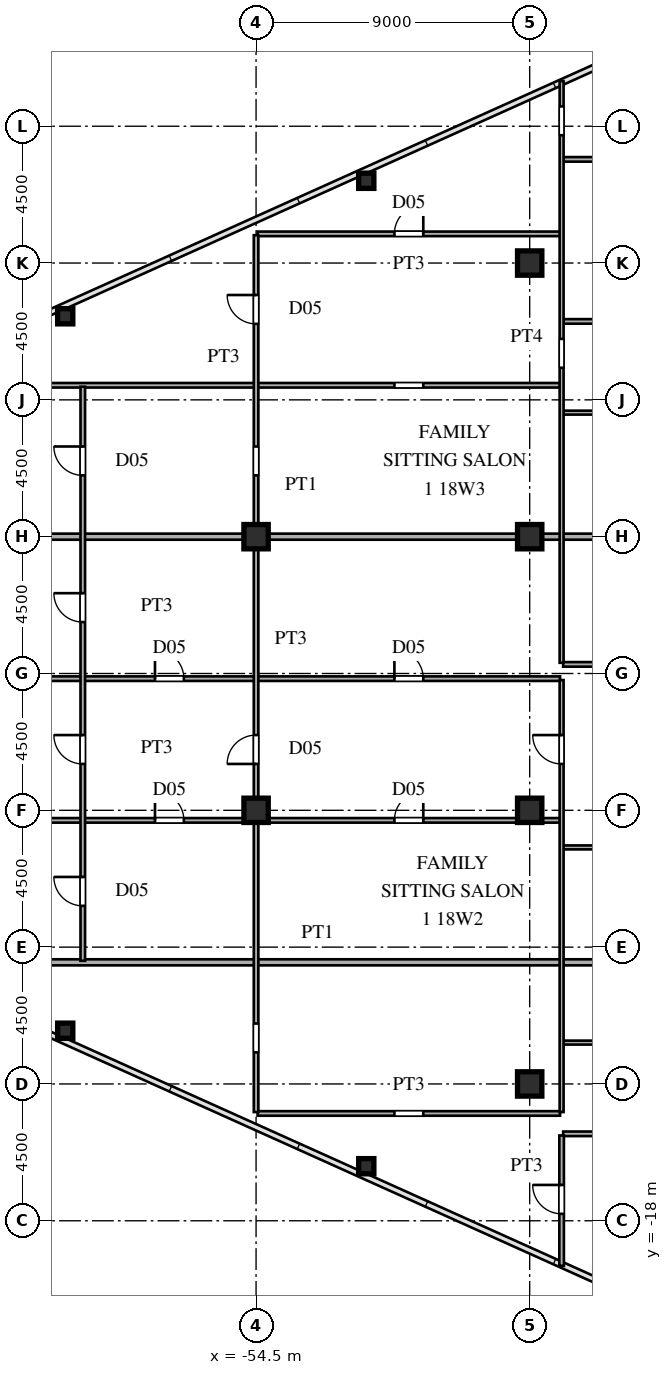
"""IFC4 building model, lengths in metres.
Left out: names, types, materials, properties, quantities, classifications, styles, units other than length and angle.
Written with IfcOpenShell. Run it as: python <this file> out.ifc"""

import sys

from ifc_helpers import new_model, si_unit, direction, frame, frame_2d, origin, origin_2d, place, context, subcontext, project, spatial, rectangle, hollow_rectangle, i_section, extrude, source, transform, mapped, element, fill, save


model = new_model("IFC4")
c1 = context("Model", 3, precision=1e-05, world=origin(), true_north=direction((0.0, 1.0)))
c2 = subcontext(c1, "Body", "Model", "MODEL_VIEW")
j1 = project(units=[si_unit("LENGTHUNIT", "METRE"), si_unit("PLANEANGLEUNIT", "RADIAN")], contexts=[c1])
p1 = place(None, origin())
s1 = spatial("IfcSite", under=j1, at=p1, CompositionType="ELEMENT")
p2 = place(p1, origin())
s2 = spatial("IfcBuilding", under=s1, at=p2, CompositionType="ELEMENT")
p3 = place(p2, frame((0.0, 0.0, 69.3)))
s3 = spatial("IfcBuildingStorey", under=s2, at=p3, CompositionType="ELEMENT", Elevation=69.3)
m1 = source(origin(), c2, "Body", "SweptSolid", [
    extrude(i_section(OverallWidth=0.8, OverallDepth=0.8, WebThickness=0.032, FlangeThickness=0.05, at=origin_2d()), origin(), (0.0, 0.0, 1.0), 3.6),
])
for number, where, z_axis, x_axis in (
    (1, (-45.5, -13.5, 0.0), (0.0, 0.0, 1.0), (1.0, 0.0, 0.0)),
    (2, (-45.5, -4.5, 0.0), (0.0, 0.0, 1.0), (1.0, 0.0, 0.0)),
    (3, (-45.5, 4.5, 0.0), (0.0, 0.0, 1.0), (1.0, 0.0, 0.0)),
    (4, (-45.5, 13.5, 0.0), (0.0, 0.0, 1.0), (1.0, 0.0, 0.0)),
    (5, (-54.5, -4.5, 0.0), (0.0, 0.0, 1.0), (1.0, 0.0, 0.0)),
    (6, (-54.5, 4.5, 0.0), (0.0, 0.0, 1.0), (1.0, 0.0, 0.0)),
):
    element("IfcColumn", number, at=place(p3, frame(where, z_axis=z_axis, x_axis=x_axis)), inside=s3, PredefinedType="COLUMN", context=c2, shape_type="MappedRepresentation", body=[
        mapped(m1, transform((0.0, 0.0, 0.0), scale=1.0)),
    ])
m2 = source(origin(), c2, "Body", "SweptSolid", [
    extrude(hollow_rectangle(XDim=0.5, YDim=0.5, WallThickness=0.02, at=origin_2d()), origin(), (0.0, 0.0, 1.0), 3.6),
])
for number, where, z_axis, x_axis in (
    (7, (-50.875, -16.205, 0.0), (0.0, 0.0, 1.0), (1.0, 0.0, 0.0)),
    (8, (-60.778, -11.749, 0.0), (0.0, 0.0, 1.0), (1.0, 0.0, 0.0)),
    (9, (-50.875, 16.205, 0.0), (0.0, 0.0, 1.0), (1.0, 0.0, 0.0)),
    (10, (-60.778, 11.749, 0.0), (0.0, 0.0, 1.0), (1.0, 0.0, 0.0)),
):
    element("IfcColumn", number, at=place(p3, frame(where, z_axis=z_axis, x_axis=x_axis)), inside=s3, PredefinedType="COLUMN", context=c2, shape_type="MappedRepresentation", body=[
        mapped(m2, transform((0.0, 0.0, 0.0), scale=1.0)),
    ])
p4 = place(p3, frame((-44.4, -15.14, 0.0), z_axis=(0.0, 0.0, 1.0), x_axis=(1.0, 0.0, 0.0)))
e11 = element("IfcWall", 11, at=p4, inside=s3, PredefinedType="PARTITIONING", context=c2, shape_type="SweptSolid", body=[
    extrude(rectangle(XDim=6.05, YDim=0.15, at=frame_2d((3.025, 0.0))), origin(), (0.0, 0.0, 1.0), 3.38),
])
p5 = place(p4, frame((2.55, 0.0, 0.0)))
e12 = element("IfcOpeningElement", 12, at=p5, cuts=e11, PredefinedType="OPENING", context=c2, shape_type="SweptSolid", body=[
    extrude(rectangle(XDim=0.95, YDim=2.15, at=frame_2d((0.475, 1.075))), frame((0.0, 0.085, 0.0), z_axis=(0.0, -1.0, 0.0), x_axis=(1.0, 0.0, 0.0)), (0.0, 0.0, 1.0), 0.17),
])
p6 = place(p3, frame((-54.45, -14.47, 0.0), z_axis=(0.0, 0.0, 1.0), x_axis=(1.0, 0.0, 0.0)))
e13 = element("IfcWall", 13, at=p6, inside=s3, PredefinedType="PARTITIONING", context=c2, shape_type="SweptSolid", body=[
    extrude(rectangle(XDim=9.95, YDim=0.15, at=frame_2d((4.975, 0.0))), origin(), (0.0, 0.0, 1.0), 3.38),
])
p7 = place(p6, frame((4.5, 0.0, 0.0)))
e14 = element("IfcOpeningElement", 14, at=p7, cuts=e13, PredefinedType="OPENING", context=c2, shape_type="SweptSolid", body=[
    extrude(rectangle(XDim=0.95, YDim=2.15, at=frame_2d((0.475, 1.075))), frame((0.0, 0.085, 0.0), z_axis=(0.0, -1.0, 0.0), x_axis=(1.0, 0.0, 0.0)), (0.0, 0.0, 1.0), 0.17),
])
p8 = place(p3, frame((-44.4, -12.14, 0.0), z_axis=(0.0, 0.0, 1.0), x_axis=(1.0, 0.0, 0.0)))
e15 = element("IfcWall", 15, at=p8, inside=s3, PredefinedType="PARTITIONING", context=c2, shape_type="SweptSolid", body=[
    extrude(rectangle(XDim=6.05, YDim=0.13, at=frame_2d((3.025, 0.0))), origin(), (0.0, 0.0, 1.0), 3.38),
])
p9 = place(p8, frame((2.585, 0.0, 0.0)))
e16 = element("IfcOpeningElement", 16, at=p9, cuts=e15, PredefinedType="OPENING", context=c2, shape_type="SweptSolid", body=[
    extrude(rectangle(XDim=0.88, YDim=2.1, at=frame_2d((0.44, 1.05))), frame((0.0, 0.075, 0.0), z_axis=(0.0, -1.0, 0.0), x_axis=(1.0, 0.0, 0.0)), (0.0, 0.0, 1.0), 0.15),
])
p10 = place(p3, frame((-66.568, -9.5, 0.0), z_axis=(0.0, 0.0, 1.0), x_axis=(1.0, 0.0, 0.0)))
e17 = element("IfcWall", 17, at=p10, inside=s3, PredefinedType="PARTITIONING", context=c2, shape_type="SweptSolid", body=[
    extrude(rectangle(XDim=28.188, YDim=0.2, at=frame_2d((14.094, 0.0))), origin(), (0.0, 0.0, 1.0), 3.38),
])
p11 = place(p3, frame((-44.4, -5.72, 0.0), z_axis=(0.0, 0.0, 1.0), x_axis=(1.0, 0.0, 0.0)))
e18 = element("IfcWall", 18, at=p11, inside=s3, PredefinedType="PARTITIONING", context=c2, shape_type="SweptSolid", body=[
    extrude(rectangle(XDim=6.05, YDim=0.13, at=frame_2d((3.025, 0.0))), origin(), (0.0, 0.0, 1.0), 3.38),
])
p12 = place(p11, frame((2.585, 0.0, 0.0)))
e19 = element("IfcOpeningElement", 19, at=p12, cuts=e18, PredefinedType="OPENING", context=c2, shape_type="SweptSolid", body=[
    extrude(rectangle(XDim=0.88, YDim=2.1, at=frame_2d((0.44, 1.05))), frame((0.0, 0.075, 0.0), z_axis=(0.0, -1.0, 0.0), x_axis=(1.0, 0.0, 0.0)), (0.0, 0.0, 1.0), 0.15),
])
p13 = place(p3, frame((-71.035, -4.83, 0.0), z_axis=(0.0, 0.0, 1.0), x_axis=(1.0, 0.0, 0.0)))
e20 = element("IfcWall", 20, at=p13, inside=s3, PredefinedType="PARTITIONING", context=c2, shape_type="SweptSolid", body=[
    extrude(rectangle(XDim=26.535, YDim=0.15, at=frame_2d((13.268, 0.0))), origin(), (0.0, 0.0, 1.0), 3.38),
])
p14 = place(p13, frame((21.085, 0.0, 0.0)))
e21 = element("IfcOpeningElement", 21, at=p14, cuts=e20, PredefinedType="OPENING", context=c2, shape_type="SweptSolid", body=[
    extrude(rectangle(XDim=0.95, YDim=2.15, at=frame_2d((0.475, 1.075))), frame((0.0, 0.085, 0.0), z_axis=(0.0, -1.0, 0.0), x_axis=(1.0, 0.0, 0.0)), (0.0, 0.0, 1.0), 0.17),
])
p15 = place(p13, frame((13.21, 0.0, 0.0)))
e22 = element("IfcOpeningElement", 22, at=p15, cuts=e20, PredefinedType="OPENING", context=c2, shape_type="SweptSolid", body=[
    extrude(rectangle(XDim=0.95, YDim=2.15, at=frame_2d((0.475, 1.075))), frame((0.0, 0.085, 0.0), z_axis=(0.0, -1.0, 0.0), x_axis=(1.0, 0.0, 0.0)), (0.0, 0.0, 1.0), 0.17),
])
p16 = place(p3, frame((-71.035, -0.17, 0.0), z_axis=(0.0, 0.0, 1.0), x_axis=(1.0, 0.0, 0.0)))
e23 = element("IfcWall", 23, at=p16, inside=s3, PredefinedType="PARTITIONING", context=c2, shape_type="SweptSolid", body=[
    extrude(rectangle(XDim=26.535, YDim=0.15, at=frame_2d((13.268, 0.0))), origin(), (0.0, 0.0, 1.0), 3.38),
])
p17 = place(p16, frame((21.085, 0.0, 0.0)))
e24 = element("IfcOpeningElement", 24, at=p17, cuts=e23, PredefinedType="OPENING", context=c2, shape_type="SweptSolid", body=[
    extrude(rectangle(XDim=0.95, YDim=2.15, at=frame_2d((0.475, 1.075))), frame((0.0, 0.085, 0.0), z_axis=(0.0, -1.0, 0.0), x_axis=(1.0, 0.0, 0.0)), (0.0, 0.0, 1.0), 0.17),
])
p18 = place(p16, frame((13.21, 0.0, 0.0)))
e25 = element("IfcOpeningElement", 25, at=p18, cuts=e23, PredefinedType="OPENING", context=c2, shape_type="SweptSolid", body=[
    extrude(rectangle(XDim=0.95, YDim=2.15, at=frame_2d((0.475, 1.075))), frame((0.0, 0.085, 0.0), z_axis=(0.0, -1.0, 0.0), x_axis=(1.0, 0.0, 0.0)), (0.0, 0.0, 1.0), 0.17),
])
p19 = place(p3, frame((-44.4, 0.3, 0.0), z_axis=(0.0, 0.0, 1.0), x_axis=(1.0, 0.0, 0.0)))
e26 = element("IfcWall", 26, at=p19, inside=s3, PredefinedType="PARTITIONING", context=c2, shape_type="SweptSolid", body=[
    extrude(rectangle(XDim=6.05, YDim=0.15, at=frame_2d((3.025, 0.0))), origin(), (0.0, 0.0, 1.0), 3.38),
])
p20 = place(p19, frame((2.55, 0.0, 0.0)))
e27 = element("IfcOpeningElement", 27, at=p20, cuts=e26, PredefinedType="OPENING", context=c2, shape_type="SweptSolid", body=[
    extrude(rectangle(XDim=0.95, YDim=2.15, at=frame_2d((0.475, 1.075))), frame((0.0, 0.085, 0.0), z_axis=(0.0, -1.0, 0.0), x_axis=(1.0, 0.0, 0.0)), (0.0, 0.0, 1.0), 0.17),
])
p21 = place(p3, frame((-71.005, 4.5, 0.0), z_axis=(0.0, 0.0, 1.0), x_axis=(1.0, 0.0, 0.0)))
e28 = element("IfcWall", 28, at=p21, inside=s3, PredefinedType="PARTITIONING", context=c2, shape_type="SweptSolid", body=[
    extrude(rectangle(XDim=16.485, YDim=0.2, at=frame_2d((8.242, 0.0))), origin(), (0.0, 0.0, 1.0), 3.38),
])
p22 = place(p3, frame((-54.52, 4.5, 0.0), z_axis=(0.0, 0.0, 1.0), x_axis=(1.0, 0.0, 0.0)))
e29 = element("IfcWall", 29, at=p22, inside=s3, PredefinedType="PARTITIONING", context=c2, shape_type="SweptSolid", body=[
    extrude(rectangle(XDim=16.14, YDim=0.2, at=frame_2d((8.07, 0.0))), origin(), (0.0, 0.0, 1.0), 2.68),
])
p23 = place(p3, frame((-44.4, 8.58, 0.0), z_axis=(0.0, 0.0, 1.0), x_axis=(1.0, 0.0, 0.0)))
e30 = element("IfcWall", 30, at=p23, inside=s3, PredefinedType="PARTITIONING", context=c2, shape_type="SweptSolid", body=[
    extrude(rectangle(XDim=6.05, YDim=0.13, at=frame_2d((3.025, 0.0))), origin(), (0.0, 0.0, 1.0), 3.38),
])
p24 = place(p23, frame((2.585, 0.0, 0.0)))
e31 = element("IfcOpeningElement", 31, at=p24, cuts=e30, PredefinedType="OPENING", context=c2, shape_type="SweptSolid", body=[
    extrude(rectangle(XDim=0.88, YDim=2.1, at=frame_2d((0.44, 1.05))), frame((0.0, 0.075, 0.0), z_axis=(0.0, -1.0, 0.0), x_axis=(1.0, 0.0, 0.0)), (0.0, 0.0, 1.0), 0.15),
])
p25 = place(p3, frame((-66.629, 9.48, 0.0), z_axis=(0.0, 0.0, 1.0), x_axis=(1.0, 0.0, 0.0)))
e32 = element("IfcWall", 32, at=p25, inside=s3, PredefinedType="PARTITIONING", context=c2, shape_type="SweptSolid", body=[
    extrude(rectangle(XDim=22.129, YDim=0.15, at=frame_2d((11.064, 0.0))), origin(), (0.0, 0.0, 1.0), 3.38),
])
p26 = place(p25, frame((16.679, 0.0, 0.0)))
e33 = element("IfcOpeningElement", 33, at=p26, cuts=e32, PredefinedType="OPENING", context=c2, shape_type="SweptSolid", body=[
    extrude(rectangle(XDim=0.95, YDim=2.15, at=frame_2d((0.475, 1.075))), frame((0.0, 0.085, 0.0), z_axis=(0.0, -1.0, 0.0), x_axis=(1.0, 0.0, 0.0)), (0.0, 0.0, 1.0), 0.17),
])
p27 = place(p3, frame((-44.4, 11.58, 0.0), z_axis=(0.0, 0.0, 1.0), x_axis=(1.0, 0.0, 0.0)))
e34 = element("IfcWall", 34, at=p27, inside=s3, PredefinedType="PARTITIONING", context=c2, shape_type="SweptSolid", body=[
    extrude(rectangle(XDim=6.05, YDim=0.15, at=frame_2d((3.025, 0.0))), origin(), (0.0, 0.0, 1.0), 3.38),
])
p28 = place(p27, frame((2.55, 0.0, 0.0)))
e35 = element("IfcOpeningElement", 35, at=p28, cuts=e34, PredefinedType="OPENING", context=c2, shape_type="SweptSolid", body=[
    extrude(rectangle(XDim=0.95, YDim=2.15, at=frame_2d((0.475, 1.075))), frame((0.0, 0.085, 0.0), z_axis=(0.0, -1.0, 0.0), x_axis=(1.0, 0.0, 0.0)), (0.0, 0.0, 1.0), 0.17),
])
p29 = place(p3, frame((-54.45, 14.46, 0.0), z_axis=(0.0, 0.0, 1.0), x_axis=(1.0, 0.0, 0.0)))
e36 = element("IfcWall", 36, at=p29, inside=s3, PredefinedType="PARTITIONING", context=c2, shape_type="SweptSolid", body=[
    extrude(rectangle(XDim=9.95, YDim=0.15, at=frame_2d((4.975, 0.0))), origin(), (0.0, 0.0, 1.0), 3.38),
])
p30 = place(p29, frame((4.5, 0.0, 0.0)))
e37 = element("IfcOpeningElement", 37, at=p30, cuts=e36, PredefinedType="OPENING", context=c2, shape_type="SweptSolid", body=[
    extrude(rectangle(XDim=0.95, YDim=2.15, at=frame_2d((0.475, 1.075))), frame((0.0, 0.085, 0.0), z_axis=(0.0, -1.0, 0.0), x_axis=(1.0, 0.0, 0.0)), (0.0, 0.0, 1.0), 0.17),
])
p31 = place(p3, frame((-44.4, 16.91, 0.0), z_axis=(0.0, 0.0, 1.0), x_axis=(1.0, 0.0, 0.0)))
e38 = element("IfcWall", 38, at=p31, inside=s3, PredefinedType="PARTITIONING", context=c2, shape_type="SweptSolid", body=[
    extrude(rectangle(XDim=6.1, YDim=0.15, at=frame_2d((3.05, 0.0))), origin(), (0.0, 0.0, 1.0), 3.38),
])
p32 = place(p3, frame((-60.2, -9.45, 0.0), z_axis=(0.0, 0.0, 1.0), x_axis=(0.0, 1.0, 0.0)))
e39 = element("IfcWall", 39, at=p32, inside=s3, PredefinedType="PARTITIONING", context=c2, shape_type="SweptSolid", body=[
    extrude(rectangle(XDim=18.883, YDim=0.15, at=frame_2d((9.441, 0.0))), origin(), (0.0, 0.0, 1.0), 3.38),
])
p33 = place(p32, frame((1.808, 0.0, 0.0)))
e40 = element("IfcOpeningElement", 40, at=p33, cuts=e39, PredefinedType="OPENING", context=c2, shape_type="SweptSolid", body=[
    extrude(rectangle(XDim=0.95, YDim=2.15, at=frame_2d((0.475, 1.075))), frame((0.0, 0.085, 0.0), z_axis=(0.0, -1.0, 0.0), x_axis=(1.0, 0.0, 0.0)), (0.0, 0.0, 1.0), 0.17),
])
p34 = place(p32, frame((6.475, 0.0, 0.0)))
e41 = element("IfcOpeningElement", 41, at=p34, cuts=e39, PredefinedType="OPENING", context=c2, shape_type="SweptSolid", body=[
    extrude(rectangle(XDim=0.95, YDim=2.15, at=frame_2d((0.475, 1.075))), frame((0.0, 0.085, 0.0), z_axis=(0.0, -1.0, 0.0), x_axis=(1.0, 0.0, 0.0)), (0.0, 0.0, 1.0), 0.17),
])
p35 = place(p32, frame((11.142, 0.0, 0.0)))
e42 = element("IfcOpeningElement", 42, at=p35, cuts=e39, PredefinedType="OPENING", context=c2, shape_type="SweptSolid", body=[
    extrude(rectangle(XDim=0.95, YDim=2.15, at=frame_2d((0.475, 1.075))), frame((0.0, 0.085, 0.0), z_axis=(0.0, -1.0, 0.0), x_axis=(1.0, 0.0, 0.0)), (0.0, 0.0, 1.0), 0.17),
])
p36 = place(p32, frame((15.966, 0.0, 0.0)))
e43 = element("IfcOpeningElement", 43, at=p36, cuts=e39, PredefinedType="OPENING", context=c2, shape_type="SweptSolid", body=[
    extrude(rectangle(XDim=0.95, YDim=2.15, at=frame_2d((0.475, 1.075))), frame((0.0, 0.085, 0.0), z_axis=(0.0, -1.0, 0.0), x_axis=(1.0, 0.0, 0.0)), (0.0, 0.0, 1.0), 0.17),
])
p37 = place(p3, frame((-54.5, -14.424, 0.0), z_axis=(0.0, 0.0, 1.0), x_axis=(0.0, 1.0, 0.0)))
e44 = element("IfcWall", 44, at=p37, inside=s3, PredefinedType="PARTITIONING", context=c2, shape_type="SweptSolid", body=[
    extrude(rectangle(XDim=28.839, YDim=0.15, at=frame_2d((14.419, 0.0))), origin(), (0.0, 0.0, 1.0), 2.68),
])
p38 = place(p37, frame((1.962, 0.0, 0.0)))
e45 = element("IfcOpeningElement", 45, at=p38, cuts=e44, PredefinedType="OPENING", context=c2, shape_type="SweptSolid", body=[
    extrude(rectangle(XDim=0.95, YDim=2.15, at=frame_2d((0.475, 1.075))), frame((0.0, 0.085, 0.0), z_axis=(0.0, -1.0, 0.0), x_axis=(1.0, 0.0, 0.0)), (0.0, 0.0, 1.0), 0.17),
])
p39 = place(p37, frame((11.449, 0.0, 0.0)))
e46 = element("IfcOpeningElement", 46, at=p39, cuts=e44, PredefinedType="OPENING", context=c2, shape_type="SweptSolid", body=[
    extrude(rectangle(XDim=0.95, YDim=2.15, at=frame_2d((0.475, 1.075))), frame((0.0, 0.085, 0.0), z_axis=(0.0, -1.0, 0.0), x_axis=(1.0, 0.0, 0.0)), (0.0, 0.0, 1.0), 0.17),
])
p40 = place(p37, frame((25.923, 0.0, 0.0)))
e47 = element("IfcOpeningElement", 47, at=p40, cuts=e44, PredefinedType="OPENING", context=c2, shape_type="SweptSolid", body=[
    extrude(rectangle(XDim=0.95, YDim=2.15, at=frame_2d((0.475, 1.075))), frame((0.0, 0.085, 0.0), z_axis=(0.0, -1.0, 0.0), x_axis=(1.0, 0.0, 0.0)), (0.0, 0.0, 1.0), 0.17),
])
p41 = place(p37, frame((20.94, 0.0, 0.0)))
e48 = element("IfcOpeningElement", 48, at=p41, cuts=e44, PredefinedType="OPENING", context=c2, shape_type="SweptSolid", body=[
    extrude(rectangle(XDim=0.95, YDim=2.15, at=frame_2d((0.475, 1.075))), frame((0.0, 0.085, 0.0), z_axis=(0.0, -1.0, 0.0), x_axis=(1.0, 0.0, 0.0)), (0.0, 0.0, 1.0), 0.17),
])
p42 = place(p3, frame((-44.45, -19.483, 0.0), z_axis=(0.0, 0.0, 1.0), x_axis=(0.0, 1.0, 0.0)))
e49 = element("IfcWall", 49, at=p42, inside=s3, PredefinedType="PARTITIONING", context=c2, shape_type="SweptSolid", body=[
    extrude(rectangle(XDim=4.288, YDim=0.15, at=frame_2d((2.144, 0.0))), origin(), (0.0, 0.0, 1.0), 3.38),
])
p43 = place(p42, frame((1.712, 0.0, 0.0)))
e50 = element("IfcOpeningElement", 50, at=p43, cuts=e49, PredefinedType="OPENING", context=c2, shape_type="SweptSolid", body=[
    extrude(rectangle(XDim=0.95, YDim=2.15, at=frame_2d((0.475, 1.075))), frame((0.0, 0.085, 0.0), z_axis=(0.0, -1.0, 0.0), x_axis=(1.0, 0.0, 0.0)), (0.0, 0.0, 1.0), 0.17),
])
p44 = place(p3, frame((-44.45, -14.424, 0.0), z_axis=(0.0, 0.0, 1.0), x_axis=(0.0, 1.0, 0.0)))
e51 = element("IfcWall", 51, at=p44, inside=s3, PredefinedType="PARTITIONING", context=c2, shape_type="SweptSolid", body=[
    extrude(rectangle(XDim=14.207, YDim=0.13, at=frame_2d((7.104, 0.0))), origin(), (0.0, 0.0, 1.0), 3.38),
])
p45 = place(p44, frame((11.449, 0.0, 0.0)))
e52 = element("IfcOpeningElement", 52, at=p45, cuts=e51, PredefinedType="OPENING", context=c2, shape_type="SweptSolid", body=[
    extrude(rectangle(XDim=0.95, YDim=2.15, at=frame_2d((0.475, 1.075))), frame((0.0, 0.075, 0.0), z_axis=(0.0, -1.0, 0.0), x_axis=(1.0, 0.0, 0.0)), (0.0, 0.0, 1.0), 0.15),
])
p46 = place(p3, frame((-44.45, 0.352, 0.0), z_axis=(0.0, 0.0, 1.0), x_axis=(0.0, 1.0, 0.0)))
e53 = element("IfcWall", 53, at=p46, inside=s3, PredefinedType="PARTITIONING", context=c2, shape_type="SweptSolid", body=[
    extrude(rectangle(XDim=19.131, YDim=0.13, at=frame_2d((9.565, 0.0))), origin(), (0.0, 0.0, 1.0), 3.38),
])
p47 = place(p46, frame((9.703, 0.0, 0.0)))
e54 = element("IfcOpeningElement", 54, at=p47, cuts=e53, PredefinedType="OPENING", context=c2, shape_type="SweptSolid", body=[
    extrude(rectangle(XDim=0.95, YDim=2.15, at=frame_2d((0.475, 1.075))), frame((0.0, 0.075, 0.0), z_axis=(0.0, -1.0, 0.0), x_axis=(1.0, 0.0, 0.0)), (0.0, 0.0, 1.0), 0.15),
])
p48 = place(p46, frame((17.351, 0.0, 0.0)))
e55 = element("IfcOpeningElement", 55, at=p48, cuts=e53, PredefinedType="OPENING", context=c2, shape_type="SweptSolid", body=[
    extrude(rectangle(XDim=0.95, YDim=2.15, at=frame_2d((0.475, 1.075))), frame((0.0, 0.075, 0.0), z_axis=(0.0, -1.0, 0.0), x_axis=(1.0, 0.0, 0.0)), (0.0, 0.0, 1.0), 0.15),
])
m3 = source(origin(), c2, "Body", "SweptSolid", [
    extrude(rectangle(XDim=0.95, YDim=2.15, at=frame_2d((0.475, 1.075))), frame((0.0, 0.025, 0.0), z_axis=(0.0, -1.0, 0.0), x_axis=(1.0, 0.0, 0.0)), (0.0, 0.0, 1.0), 0.05),
])
p49 = place(p14, origin())
e56 = element("IfcDoor", 56, at=p49, inside=s3, OperationType="SINGLE_SWING_RIGHT", PredefinedType="DOOR", context=c2, shape_type="MappedRepresentation", body=[
    mapped(m3, transform((0.0, 0.0, 0.0), scale=1.0)),
])
fill(e21, e56)
p50 = place(p15, origin())
e57 = element("IfcDoor", 57, at=p50, inside=s3, OperationType="SINGLE_SWING_LEFT", PredefinedType="DOOR", context=c2, shape_type="MappedRepresentation", body=[
    mapped(m3, transform((0.0, 0.0, 0.0), scale=1.0)),
])
fill(e22, e57)
p51 = place(p17, origin())
e58 = element("IfcDoor", 58, at=p51, inside=s3, OperationType="SINGLE_SWING_LEFT", PredefinedType="DOOR", context=c2, shape_type="MappedRepresentation", body=[
    mapped(m3, transform((0.0, 0.0, 0.0), scale=1.0)),
])
fill(e24, e58)
p52 = place(p18, origin())
e59 = element("IfcDoor", 59, at=p52, inside=s3, OperationType="SINGLE_SWING_LEFT", PredefinedType="DOOR", context=c2, shape_type="MappedRepresentation", body=[
    mapped(m3, transform((0.0, 0.0, 0.0), scale=1.0)),
])
fill(e25, e59)
p53 = place(p30, origin())
e60 = element("IfcDoor", 60, at=p53, inside=s3, OperationType="SINGLE_SWING_RIGHT", PredefinedType="DOOR", context=c2, shape_type="MappedRepresentation", body=[
    mapped(m3, transform((0.0, 0.0, 0.0), scale=1.0)),
])
fill(e37, e60)
p54 = place(p33, origin())
e61 = element("IfcDoor", 61, at=p54, inside=s3, OperationType="SINGLE_SWING_RIGHT", PredefinedType="DOOR", context=c2, shape_type="MappedRepresentation", body=[
    mapped(m3, transform((0.0, 0.0, 0.0), scale=1.0)),
])
fill(e40, e61)
p55 = place(p34, origin())
e62 = element("IfcDoor", 62, at=p55, inside=s3, OperationType="SINGLE_SWING_RIGHT", PredefinedType="DOOR", context=c2, shape_type="MappedRepresentation", body=[
    mapped(m3, transform((0.0, 0.0, 0.0), scale=1.0)),
])
fill(e41, e62)
p56 = place(p35, origin())
e63 = element("IfcDoor", 63, at=p56, inside=s3, OperationType="SINGLE_SWING_RIGHT", PredefinedType="DOOR", context=c2, shape_type="MappedRepresentation", body=[
    mapped(m3, transform((0.0, 0.0, 0.0), scale=1.0)),
])
fill(e42, e63)
p57 = place(p36, origin())
e64 = element("IfcDoor", 64, at=p57, inside=s3, OperationType="SINGLE_SWING_RIGHT", PredefinedType="DOOR", context=c2, shape_type="MappedRepresentation", body=[
    mapped(m3, transform((0.0, 0.0, 0.0), scale=1.0)),
])
fill(e43, e64)
p58 = place(p39, origin())
e65 = element("IfcDoor", 65, at=p58, inside=s3, OperationType="SINGLE_SWING_LEFT", PredefinedType="DOOR", context=c2, shape_type="MappedRepresentation", body=[
    mapped(m3, transform((0.0, 0.0, 0.0), scale=1.0)),
])
fill(e46, e65)
p59 = place(p40, origin())
e66 = element("IfcDoor", 66, at=p59, inside=s3, OperationType="SINGLE_SWING_RIGHT", PredefinedType="DOOR", context=c2, shape_type="MappedRepresentation", body=[
    mapped(m3, transform((0.0, 0.0, 0.0), scale=1.0)),
])
fill(e47, e66)
p60 = place(p43, origin())
e67 = element("IfcDoor", 67, at=p60, inside=s3, OperationType="SINGLE_SWING_RIGHT", PredefinedType="DOOR", context=c2, shape_type="MappedRepresentation", body=[
    mapped(m3, transform((0.0, 0.0, 0.0), scale=1.0)),
])
fill(e50, e67)
p61 = place(p45, origin())
e68 = element("IfcDoor", 68, at=p61, inside=s3, OperationType="SINGLE_SWING_RIGHT", PredefinedType="DOOR", context=c2, shape_type="MappedRepresentation", body=[
    mapped(m3, transform((0.0, 0.0, 0.0), scale=1.0)),
])
fill(e52, e68)
save(model, sys.argv[1])
